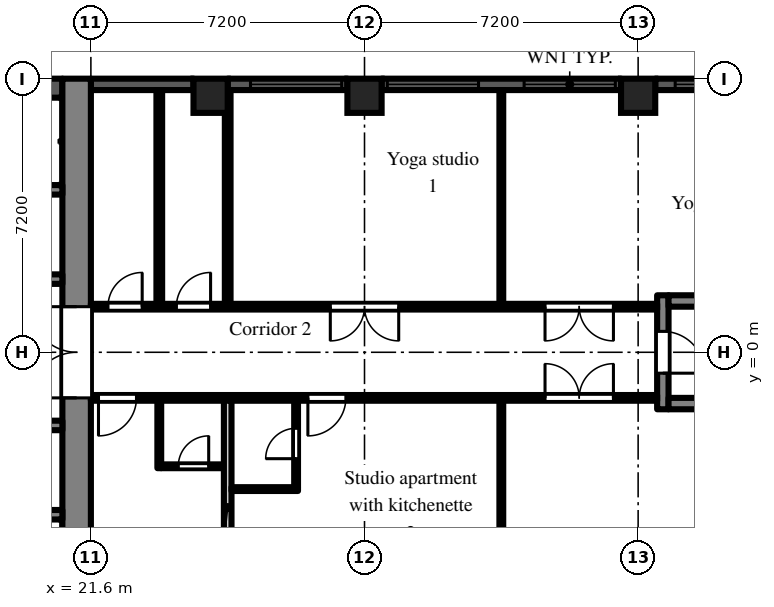
"""IFC4 building model, lengths in metres.
Left out: names, types, materials, properties, quantities, classifications, styles, units other than length and angle.
Written with IfcOpenShell. Run it as: python <this file> out.ifc"""

import sys

from ifc_helpers import new_model, si_unit, direction, frame, frame_2d, origin, origin_2d, place, context, subcontext, project, spatial, rectangle, extrude, element, fill, save


model = new_model("IFC4")
c1 = context("Model", 3, precision=1e-05, world=origin(), true_north=direction((0.0, 1.0)))
c2 = subcontext(c1, "Body", "Model", "MODEL_VIEW")
j1 = project(units=[si_unit("LENGTHUNIT", "METRE"), si_unit("PLANEANGLEUNIT", "RADIAN")], contexts=[c1])
p1 = place(None, origin())
s1 = spatial("IfcSite", under=j1, at=p1, CompositionType="ELEMENT")
p2 = place(p1, origin())
s2 = spatial("IfcBuilding", under=s1, at=p2, CompositionType="ELEMENT")
p3 = place(p2, frame((0.0, 0.0, 108.9)))
s3 = spatial("IfcBuildingStorey", under=s2, at=p3, CompositionType="ELEMENT", Elevation=108.9)
for number, where, z_axis, x_axis in (
    (1, (24.75, 6.75, 0.0), (0.0, 0.0, 1.0), (1.0, 0.0, 0.0)),
    (2, (28.8, 6.75, 0.0), (0.0, 0.0, 1.0), (1.0, 0.0, 0.0)),
    (3, (36.0, 6.75, 0.0), (0.0, 0.0, 1.0), (1.0, 0.0, 0.0)),
):
    element("IfcColumn", number, at=place(p3, frame(where, z_axis=z_axis, x_axis=x_axis)), inside=s3, PredefinedType="COLUMN", context=c2, shape_type="SweptSolid", body=[
        extrude(rectangle(XDim=0.9, YDim=0.9, at=origin_2d()), origin(), (0.0, 0.0, 1.0), 3.0),
    ])
p4 = place(p3, frame((38.7, 7.05, 0.0), z_axis=(0.0, 0.0, 1.0), x_axis=(-1.0, 0.0, 0.0)))
e4 = element("IfcWall", 4, at=p4, inside=s3, PredefinedType="SOLIDWALL", context=c2, shape_type="SweptSolid", body=[
    extrude(rectangle(XDim=2.25, YDim=0.3, at=frame_2d((1.125, 0.0))), origin(), (0.0, 0.0, 1.0), 2.2),
])
p5 = place(p4, frame((0.525, 0.0, 0.2)))
e5 = element("IfcOpeningElement", 5, at=p5, cuts=e4, PredefinedType="OPENING", context=c2, shape_type="SweptSolid", body=[
    extrude(rectangle(XDim=1.2, YDim=1.85, at=frame_2d((0.6, 0.925))), frame((0.0, 0.16, 0.0), z_axis=(0.0, -1.0, 0.0), x_axis=(1.0, 0.0, 0.0)), (0.0, 0.0, 1.0), 0.32),
])
p6 = place(p3, frame((35.55, 7.05, 0.0), z_axis=(0.0, 0.0, 1.0), x_axis=(-1.0, 0.0, 0.0)))
e6 = element("IfcWall", 6, at=p6, inside=s3, PredefinedType="SOLIDWALL", context=c2, shape_type="SweptSolid", body=[
    extrude(rectangle(XDim=6.3, YDim=0.3, at=frame_2d((3.15, 0.0))), origin(), (0.0, 0.0, 1.0), 2.2),
])
p7 = place(p6, frame((0.15, 0.0, 0.2)))
e7 = element("IfcOpeningElement", 7, at=p7, cuts=e6, PredefinedType="OPENING", context=c2, shape_type="SweptSolid", body=[
    extrude(rectangle(XDim=2.4, YDim=1.85, at=frame_2d((1.2, 0.925))), frame((0.0, 0.16, 0.0), z_axis=(0.0, -1.0, 0.0), x_axis=(1.0, 0.0, 0.0)), (0.0, 0.0, 1.0), 0.32),
])
p8 = place(p6, frame((3.75, 0.0, 0.2)))
e8 = element("IfcOpeningElement", 8, at=p8, cuts=e6, PredefinedType="OPENING", context=c2, shape_type="SweptSolid", body=[
    extrude(rectangle(XDim=2.4, YDim=1.85, at=frame_2d((1.2, 0.925))), frame((0.0, 0.16, 0.0), z_axis=(0.0, -1.0, 0.0), x_axis=(1.0, 0.0, 0.0)), (0.0, 0.0, 1.0), 0.32),
])
p9 = place(p3, frame((28.35, 7.05, 0.0), z_axis=(0.0, 0.0, 1.0), x_axis=(-1.0, 0.0, 0.0)))
e9 = element("IfcWall", 9, at=p9, inside=s3, PredefinedType="SOLIDWALL", context=c2, shape_type="SweptSolid", body=[
    extrude(rectangle(XDim=3.15, YDim=0.3, at=frame_2d((1.575, 0.0))), origin(), (0.0, 0.0, 1.0), 2.2),
])
p10 = place(p9, frame((0.15, 0.0, 0.2)))
e10 = element("IfcOpeningElement", 10, at=p10, cuts=e9, PredefinedType="OPENING", context=c2, shape_type="SweptSolid", body=[
    extrude(rectangle(XDim=2.4, YDim=1.85, at=frame_2d((1.2, 0.925))), frame((0.0, 0.16, 0.0), z_axis=(0.0, -1.0, 0.0), x_axis=(1.0, 0.0, 0.0)), (0.0, 0.0, 1.0), 0.32),
])
p11 = place(p3, frame((24.3, 7.05, 0.0), z_axis=(0.0, 0.0, 1.0), x_axis=(-1.0, 0.0, 0.0)))
e11 = element("IfcWall", 11, at=p11, inside=s3, PredefinedType="SOLIDWALL", context=c2, shape_type="SweptSolid", body=[
    extrude(rectangle(XDim=2.7, YDim=0.3, at=frame_2d((1.35, 0.0))), origin(), (0.0, 0.0, 1.0), 2.2),
])
p12 = place(p3, frame((21.225, -7.2, 0.0), z_axis=(0.0, 0.0, 1.0), x_axis=(0.0, 1.0, 0.0)))
e12 = element("IfcWall", 12, at=p12, inside=s3, PredefinedType="SHEAR", context=c2, shape_type="SweptSolid", body=[
    extrude(rectangle(XDim=14.4, YDim=0.75, at=frame_2d((7.2, 0.0))), origin(), (0.0, 0.0, 1.0), 2.55),
])
p13 = place(p12, frame((6.0, 0.0, 0.0)))
e13 = element("IfcOpeningElement", 13, at=p13, cuts=e12, PredefinedType="OPENING", context=c2, shape_type="SweptSolid", body=[
    extrude(rectangle(XDim=2.4, YDim=2.2, at=frame_2d((1.2, 1.1))), frame((0.0, 0.385, 0.0), z_axis=(0.0, -1.0, 0.0), x_axis=(1.0, 0.0, 0.0)), (0.0, 0.0, 1.0), 0.77),
])
p14 = place(p3, frame((7.9, 6.95, 0.0), z_axis=(0.0, 0.0, 1.0), x_axis=(1.0, 0.0, 0.0)))
e14 = element("IfcWall", 14, at=p14, inside=s3, PredefinedType="SHEAR", context=c2, shape_type="SweptSolid", body=[
    extrude(rectangle(XDim=12.95, YDim=0.5, at=frame_2d((6.475, 0.0))), origin(), (0.0, 0.0, 1.0), 2.55),
])
p15 = place(p3, frame((7.9, 1.925, 0.0), z_axis=(0.0, 0.0, 1.0), x_axis=(1.0, 0.0, 0.0)))
e15 = element("IfcWall", 15, at=p15, inside=s3, PredefinedType="SHEAR", context=c2, shape_type="SweptSolid", body=[
    extrude(rectangle(XDim=12.95, YDim=0.25, at=frame_2d((6.475, 0.0))), origin(), (0.0, 0.0, 1.0), 2.55),
])
p16 = place(p15, frame((0.525, 0.0, 0.0)))
e16 = element("IfcOpeningElement", 16, at=p16, cuts=e15, PredefinedType="OPENING", context=c2, shape_type="SweptSolid", body=[
    extrude(rectangle(XDim=0.9, YDim=2.1, at=frame_2d((0.45, 1.05))), frame((0.0, 0.135, 0.0), z_axis=(0.0, -1.0, 0.0), x_axis=(1.0, 0.0, 0.0)), (0.0, 0.0, 1.0), 0.27),
])
p17 = place(p15, frame((2.625, 0.0, 0.0)))
e17 = element("IfcOpeningElement", 17, at=p17, cuts=e15, PredefinedType="OPENING", context=c2, shape_type="SweptSolid", body=[
    extrude(rectangle(XDim=1.1, YDim=2.1, at=frame_2d((0.55, 1.05))), frame((0.0, 0.135, 0.0), z_axis=(0.0, -1.0, 0.0), x_axis=(1.0, 0.0, 0.0)), (0.0, 0.0, 1.0), 0.27),
])
p18 = place(p15, frame((4.925, 0.0, 0.0)))
e18 = element("IfcOpeningElement", 18, at=p18, cuts=e15, PredefinedType="OPENING", context=c2, shape_type="SweptSolid", body=[
    extrude(rectangle(XDim=0.9, YDim=2.1, at=frame_2d((0.45, 1.05))), frame((0.0, 0.135, 0.0), z_axis=(0.0, -1.0, 0.0), x_axis=(1.0, 0.0, 0.0)), (0.0, 0.0, 1.0), 0.27),
])
p19 = place(p15, frame((8.225, 0.0, 0.0)))
e19 = element("IfcOpeningElement", 19, at=p19, cuts=e15, PredefinedType="OPENING", context=c2, shape_type="SweptSolid", body=[
    extrude(rectangle(XDim=0.9, YDim=2.1, at=frame_2d((0.45, 1.05))), frame((0.0, 0.135, 0.0), z_axis=(0.0, -1.0, 0.0), x_axis=(1.0, 0.0, 0.0)), (0.0, 0.0, 1.0), 0.27),
])
p20 = place(p3, frame((12.3, 4.275, 0.0), z_axis=(0.0, 0.0, 1.0), x_axis=(1.0, 0.0, 0.0)))
e20 = element("IfcWall", 20, at=p20, inside=s3, PredefinedType="SHEAR", context=c2, shape_type="SweptSolid", body=[
    extrude(rectangle(XDim=8.55, YDim=0.25, at=frame_2d((4.275, 0.0))), origin(), (0.0, 0.0, 1.0), 2.55),
])
p21 = place(p3, frame((7.9, -1.925, 0.0), z_axis=(0.0, 0.0, 1.0), x_axis=(1.0, 0.0, 0.0)))
e21 = element("IfcWall", 21, at=p21, inside=s3, PredefinedType="SHEAR", context=c2, shape_type="SweptSolid", body=[
    extrude(rectangle(XDim=12.95, YDim=0.25, at=frame_2d((6.475, 0.0))), origin(), (0.0, 0.0, 1.0), 2.55),
])
p22 = place(p21, frame((4.825, 0.0, 0.0)))
e22 = element("IfcOpeningElement", 22, at=p22, cuts=e21, PredefinedType="OPENING", context=c2, shape_type="SweptSolid", body=[
    extrude(rectangle(XDim=1.1, YDim=2.1, at=frame_2d((0.55, 1.05))), frame((0.0, 0.135, 0.0), z_axis=(0.0, -1.0, 0.0), x_axis=(1.0, 0.0, 0.0)), (0.0, 0.0, 1.0), 0.27),
])
p23 = place(p21, frame((7.025, 0.0, 0.0)))
e23 = element("IfcOpeningElement", 23, at=p23, cuts=e21, PredefinedType="OPENING", context=c2, shape_type="SweptSolid", body=[
    extrude(rectangle(XDim=1.1, YDim=2.1, at=frame_2d((0.55, 1.05))), frame((0.0, 0.135, 0.0), z_axis=(0.0, -1.0, 0.0), x_axis=(1.0, 0.0, 0.0)), (0.0, 0.0, 1.0), 0.27),
])
p24 = place(p21, frame((9.225, 0.0, 0.0)))
e24 = element("IfcOpeningElement", 24, at=p24, cuts=e21, PredefinedType="OPENING", context=c2, shape_type="SweptSolid", body=[
    extrude(rectangle(XDim=1.1, YDim=2.1, at=frame_2d((0.55, 1.05))), frame((0.0, 0.135, 0.0), z_axis=(0.0, -1.0, 0.0), x_axis=(1.0, 0.0, 0.0)), (0.0, 0.0, 1.0), 0.27),
])
p25 = place(p21, frame((0.525, 0.0, 0.0)))
e25 = element("IfcOpeningElement", 25, at=p25, cuts=e21, PredefinedType="OPENING", context=c2, shape_type="SweptSolid", body=[
    extrude(rectangle(XDim=0.9, YDim=2.1, at=frame_2d((0.45, 1.05))), frame((0.0, 0.135, 0.0), z_axis=(0.0, -1.0, 0.0), x_axis=(1.0, 0.0, 0.0)), (0.0, 0.0, 1.0), 0.27),
])
p26 = place(p21, frame((2.625, 0.0, 0.0)))
e26 = element("IfcOpeningElement", 26, at=p26, cuts=e21, PredefinedType="OPENING", context=c2, shape_type="SweptSolid", body=[
    extrude(rectangle(XDim=1.1, YDim=2.1, at=frame_2d((0.55, 1.05))), frame((0.0, 0.135, 0.0), z_axis=(0.0, -1.0, 0.0), x_axis=(1.0, 0.0, 0.0)), (0.0, 0.0, 1.0), 0.27),
])
p27 = place(p3, frame((12.3, -4.275, 0.0), z_axis=(0.0, 0.0, 1.0), x_axis=(1.0, 0.0, 0.0)))
e27 = element("IfcWall", 27, at=p27, inside=s3, PredefinedType="SHEAR", context=c2, shape_type="SweptSolid", body=[
    extrude(rectangle(XDim=8.55, YDim=0.25, at=frame_2d((4.275, 0.0))), origin(), (0.0, 0.0, 1.0), 2.55),
])
p28 = place(p3, frame((36.65, -1.5, 0.0), z_axis=(0.0, 0.0, 1.0), x_axis=(0.0, 1.0, 0.0)))
e28 = element("IfcWall", 28, at=p28, inside=s3, PredefinedType="SHEAR", context=c2, shape_type="SweptSolid", body=[
    extrude(rectangle(XDim=3.0, YDim=0.3, at=frame_2d((1.5, 0.0))), origin(), (0.0, 0.0, 1.0), 2.55),
])
p29 = place(p28, frame((0.95, 0.0, 0.0)))
e29 = element("IfcOpeningElement", 29, at=p29, cuts=e28, PredefinedType="OPENING", context=c2, shape_type="SweptSolid", body=[
    extrude(rectangle(XDim=1.1, YDim=2.1, at=frame_2d((0.55, 1.05))), frame((0.0, 0.16, 0.0), z_axis=(0.0, -1.0, 0.0), x_axis=(1.0, 0.0, 0.0)), (0.0, 0.0, 1.0), 0.32),
])
for number, where, z_axis, x_axis in (
    (30, (36.8, -1.35, 0.0), (0.0, 0.0, 1.0), (1.0, 0.0, 0.0)),
    (31, (36.8, 1.35, 0.0), (0.0, 0.0, 1.0), (1.0, 0.0, 0.0)),
):
    element("IfcWall", number, at=place(p3, frame(where, z_axis=z_axis, x_axis=x_axis)), inside=s3, PredefinedType="SHEAR", context=c2, shape_type="SweptSolid", body=[
        extrude(rectangle(XDim=5.8, YDim=0.3, at=frame_2d((2.9, 0.0))), origin(), (0.0, 0.0, 1.0), 2.55),
    ])
p30 = place(p3, frame((21.6, -1.2, 0.0), z_axis=(0.0, 0.0, 1.0), x_axis=(1.0, 0.0, 0.0)))
e32 = element("IfcWall", 32, at=p30, inside=s3, PredefinedType="PARTITIONING", context=c2, shape_type="SweptSolid", body=[
    extrude(rectangle(XDim=14.9, YDim=0.15, at=frame_2d((7.45, 0.0))), origin(), (0.0, 0.0, 1.0), 2.55),
])
p31 = place(p30, frame((0.2, 0.0, 0.0)))
e33 = element("IfcOpeningElement", 33, at=p31, cuts=e32, PredefinedType="OPENING", context=c2, shape_type="SweptSolid", body=[
    extrude(rectangle(XDim=1.0, YDim=2.1, at=frame_2d((0.5, 1.05))), frame((0.0, 0.085, 0.0), z_axis=(0.0, -1.0, 0.0), x_axis=(1.0, 0.0, 0.0)), (0.0, 0.0, 1.0), 0.17),
])
p32 = place(p30, frame((5.71, 0.0, 0.0)))
e34 = element("IfcOpeningElement", 34, at=p32, cuts=e32, PredefinedType="OPENING", context=c2, shape_type="SweptSolid", body=[
    extrude(rectangle(XDim=1.0, YDim=2.1, at=frame_2d((0.5, 1.05))), frame((0.0, 0.085, 0.0), z_axis=(0.0, -1.0, 0.0), x_axis=(1.0, 0.0, 0.0)), (0.0, 0.0, 1.0), 0.17),
])
p33 = place(p30, frame((11.95, 0.0, 0.0)))
e35 = element("IfcOpeningElement", 35, at=p33, cuts=e32, PredefinedType="OPENING", context=c2, shape_type="SweptSolid", body=[
    extrude(rectangle(XDim=1.8, YDim=2.1, at=frame_2d((0.9, 1.05))), frame((0.0, 0.085, 0.0), z_axis=(0.0, -1.0, 0.0), x_axis=(1.0, 0.0, 0.0)), (0.0, 0.0, 1.0), 0.17),
])
p34 = place(p3, frame((21.6, 1.2, 0.0), z_axis=(0.0, 0.0, 1.0), x_axis=(1.0, 0.0, 0.0)))
e36 = element("IfcWall", 36, at=p34, inside=s3, PredefinedType="PARTITIONING", context=c2, shape_type="SweptSolid", body=[
    extrude(rectangle(XDim=14.9, YDim=0.15, at=frame_2d((7.45, 0.0))), origin(), (0.0, 0.0, 1.0), 2.55),
])
p35 = place(p34, frame((0.45, 0.0, 0.0)))
e37 = element("IfcOpeningElement", 37, at=p35, cuts=e36, PredefinedType="OPENING", context=c2, shape_type="SweptSolid", body=[
    extrude(rectangle(XDim=0.9, YDim=2.1, at=frame_2d((0.45, 1.05))), frame((0.0, 0.085, 0.0), z_axis=(0.0, -1.0, 0.0), x_axis=(1.0, 0.0, 0.0)), (0.0, 0.0, 1.0), 0.17),
])
p36 = place(p34, frame((2.25, 0.0, 0.0)))
e38 = element("IfcOpeningElement", 38, at=p36, cuts=e36, PredefinedType="OPENING", context=c2, shape_type="SweptSolid", body=[
    extrude(rectangle(XDim=0.9, YDim=2.1, at=frame_2d((0.45, 1.05))), frame((0.0, 0.085, 0.0), z_axis=(0.0, -1.0, 0.0), x_axis=(1.0, 0.0, 0.0)), (0.0, 0.0, 1.0), 0.17),
])
p37 = place(p34, frame((6.3, 0.0, 0.0)))
e39 = element("IfcOpeningElement", 39, at=p37, cuts=e36, PredefinedType="OPENING", context=c2, shape_type="SweptSolid", body=[
    extrude(rectangle(XDim=1.8, YDim=2.1, at=frame_2d((0.9, 1.05))), frame((0.0, 0.085, 0.0), z_axis=(0.0, -1.0, 0.0), x_axis=(1.0, 0.0, 0.0)), (0.0, 0.0, 1.0), 0.17),
])
p38 = place(p34, frame((11.95, 0.0, 0.0)))
e40 = element("IfcOpeningElement", 40, at=p38, cuts=e36, PredefinedType="OPENING", context=c2, shape_type="SweptSolid", body=[
    extrude(rectangle(XDim=1.8, YDim=2.1, at=frame_2d((0.9, 1.05))), frame((0.0, 0.085, 0.0), z_axis=(0.0, -1.0, 0.0), x_axis=(1.0, 0.0, 0.0)), (0.0, 0.0, 1.0), 0.17),
])
p39 = place(p3, frame((23.4, -3.05, 0.0), z_axis=(0.0, 0.0, 1.0), x_axis=(0.0, 1.0, 0.0)))
e41 = element("IfcWall", 41, at=p39, inside=s3, PredefinedType="PARTITIONING", context=c2, shape_type="SweptSolid", body=[
    extrude(rectangle(XDim=1.775, YDim=0.1, at=frame_2d((0.888, 0.0))), origin(), (0.0, 0.0, 1.0), 2.55),
])
p40 = place(p3, frame((23.45, -3.0, 0.0), z_axis=(0.0, 0.0, 1.0), x_axis=(1.0, 0.0, 0.0)))
e42 = element("IfcWall", 42, at=p40, inside=s3, PredefinedType="PARTITIONING", context=c2, shape_type="SweptSolid", body=[
    extrude(rectangle(XDim=1.65, YDim=0.1, at=frame_2d((0.825, 0.0))), origin(), (0.0, 0.0, 1.0), 2.55),
])
p41 = place(p40, frame((0.45, 0.0, 0.0)))
e43 = element("IfcOpeningElement", 43, at=p41, cuts=e42, PredefinedType="OPENING", context=c2, shape_type="SweptSolid", body=[
    extrude(rectangle(XDim=0.8, YDim=2.1, at=frame_2d((0.4, 1.05))), frame((0.0, 0.06, 0.0), z_axis=(0.0, -1.0, 0.0), x_axis=(1.0, 0.0, 0.0)), (0.0, 0.0, 1.0), 0.12),
])
p42 = place(p3, frame((23.4, 1.275, 0.0), z_axis=(0.0, 0.0, 1.0), x_axis=(0.0, 1.0, 0.0)))
e44 = element("IfcWall", 44, at=p42, inside=s3, PredefinedType="PARTITIONING", context=c2, shape_type="SweptSolid", body=[
    extrude(rectangle(XDim=5.625, YDim=0.15, at=frame_2d((2.812, 0.0))), origin(), (0.0, 0.0, 1.0), 2.55),
])
p43 = place(p3, frame((25.2, -6.9, 0.0), z_axis=(0.0, 0.0, 1.0), x_axis=(0.0, 1.0, 0.0)))
e45 = element("IfcWall", 45, at=p43, inside=s3, PredefinedType="PARTITIONING", context=c2, shape_type="SweptSolid", body=[
    extrude(rectangle(XDim=5.625, YDim=0.2, at=frame_2d((2.812, 0.0))), origin(), (0.0, 0.0, 1.0), 2.55),
])
p44 = place(p3, frame((25.3, -3.6, 0.0), z_axis=(0.0, 0.0, 1.0), x_axis=(1.0, 0.0, 0.0)))
e46 = element("IfcWall", 46, at=p44, inside=s3, PredefinedType="PARTITIONING", context=c2, shape_type="SweptSolid", body=[
    extrude(rectangle(XDim=1.75, YDim=0.1, at=frame_2d((0.875, 0.0))), origin(), (0.0, 0.0, 1.0), 2.55),
])
p45 = place(p3, frame((25.2, 1.275, 0.0), z_axis=(0.0, 0.0, 1.0), x_axis=(0.0, 1.0, 0.0)))
e47 = element("IfcWall", 47, at=p45, inside=s3, PredefinedType="PARTITIONING", context=c2, shape_type="SweptSolid", body=[
    extrude(rectangle(XDim=5.625, YDim=0.15, at=frame_2d((2.812, 0.0))), origin(), (0.0, 0.0, 1.0), 2.55),
])
p46 = place(p3, frame((27.0, -3.55, 0.0), z_axis=(0.0, 0.0, 1.0), x_axis=(0.0, 1.0, 0.0)))
e48 = element("IfcWall", 48, at=p46, inside=s3, PredefinedType="PARTITIONING", context=c2, shape_type="SweptSolid", body=[
    extrude(rectangle(XDim=2.275, YDim=0.1, at=frame_2d((1.138, 0.0))), origin(), (0.0, 0.0, 1.0), 2.55),
])
p47 = place(p46, frame((0.75, 0.0, 0.0)))
e49 = element("IfcOpeningElement", 49, at=p47, cuts=e48, PredefinedType="OPENING", context=c2, shape_type="SweptSolid", body=[
    extrude(rectangle(XDim=0.8, YDim=2.1, at=frame_2d((0.4, 1.05))), frame((0.0, 0.06, 0.0), z_axis=(0.0, -1.0, 0.0), x_axis=(1.0, 0.0, 0.0)), (0.0, 0.0, 1.0), 0.12),
])
for number, where, z_axis, x_axis in (
    (50, (32.4, -6.9, 0.0), (0.0, 0.0, 1.0), (0.0, 1.0, 0.0)),
    (51, (32.4, 1.275, 0.0), (0.0, 0.0, 1.0), (0.0, 1.0, 0.0)),
):
    element("IfcWall", number, at=place(p3, frame(where, z_axis=z_axis, x_axis=x_axis)), inside=s3, PredefinedType="PARTITIONING", context=c2, shape_type="SweptSolid", body=[
        extrude(rectangle(XDim=5.625, YDim=0.1, at=frame_2d((2.812, 0.0))), origin(), (0.0, 0.0, 1.0), 2.55),
    ])
p48 = place(p5, origin())
e52 = element("IfcWindow", 52, at=p48, inside=s3, PartitioningType="SINGLE_PANEL", PredefinedType="WINDOW", context=c2, shape_type="SweptSolid", body=[
    extrude(rectangle(XDim=1.2, YDim=1.85, at=frame_2d((0.6, 0.925))), frame((0.0, 0.03, 0.0), z_axis=(0.0, -1.0, 0.0), x_axis=(1.0, 0.0, 0.0)), (0.0, 0.0, 1.0), 0.06),
])
fill(e5, e52)
p49 = place(p7, origin())
e53 = element("IfcWindow", 53, at=p49, inside=s3, PartitioningType="SINGLE_PANEL", PredefinedType="WINDOW", context=c2, shape_type="SweptSolid", body=[
    extrude(rectangle(XDim=2.4, YDim=1.85, at=frame_2d((1.2, 0.925))), frame((0.0, 0.03, 0.0), z_axis=(0.0, -1.0, 0.0), x_axis=(1.0, 0.0, 0.0)), (0.0, 0.0, 1.0), 0.06),
])
fill(e7, e53)
p50 = place(p8, origin())
e54 = element("IfcWindow", 54, at=p50, inside=s3, PartitioningType="SINGLE_PANEL", PredefinedType="WINDOW", context=c2, shape_type="SweptSolid", body=[
    extrude(rectangle(XDim=2.4, YDim=1.85, at=frame_2d((1.2, 0.925))), frame((0.0, 0.03, 0.0), z_axis=(0.0, -1.0, 0.0), x_axis=(1.0, 0.0, 0.0)), (0.0, 0.0, 1.0), 0.06),
])
fill(e8, e54)
p51 = place(p10, origin())
e55 = element("IfcWindow", 55, at=p51, inside=s3, PartitioningType="SINGLE_PANEL", PredefinedType="WINDOW", context=c2, shape_type="SweptSolid", body=[
    extrude(rectangle(XDim=2.4, YDim=1.85, at=frame_2d((1.2, 0.925))), frame((0.0, 0.03, 0.0), z_axis=(0.0, -1.0, 0.0), x_axis=(1.0, 0.0, 0.0)), (0.0, 0.0, 1.0), 0.06),
])
fill(e10, e55)
p52 = place(p13, origin())
e56 = element("IfcDoor", 56, at=p52, inside=s3, OperationType="DOUBLE_DOOR_DOUBLE_SWING", PredefinedType="DOOR", context=c2, shape_type="SweptSolid", body=[
    extrude(rectangle(XDim=2.4, YDim=2.2, at=frame_2d((1.2, 1.1))), frame((0.0, 0.025, 0.0), z_axis=(0.0, -1.0, 0.0), x_axis=(1.0, 0.0, 0.0)), (0.0, 0.0, 1.0), 0.05),
])
fill(e13, e56)
p53 = place(p29, frame((1.1, 0.0, 0.0), z_axis=(0.0, 0.0, 1.0), x_axis=(-1.0, 0.0, 0.0)))
e57 = element("IfcDoor", 57, at=p53, inside=s3, OperationType="SINGLE_SWING_RIGHT", PredefinedType="DOOR", context=c2, shape_type="SweptSolid", body=[
    extrude(rectangle(XDim=1.1, YDim=2.1, at=frame_2d((0.55, 1.05))), frame((0.0, 0.025, 0.0), z_axis=(0.0, -1.0, 0.0), x_axis=(1.0, 0.0, 0.0)), (0.0, 0.0, 1.0), 0.05),
])
fill(e29, e57)
p54 = place(p35, origin())
e58 = element("IfcDoor", 58, at=p54, inside=s3, OperationType="SINGLE_SWING_RIGHT", PredefinedType="DOOR", context=c2, shape_type="SweptSolid", body=[
    extrude(rectangle(XDim=0.9, YDim=2.1, at=frame_2d((0.45, 1.05))), frame((0.0, 0.025, 0.0), z_axis=(0.0, -1.0, 0.0), x_axis=(1.0, 0.0, 0.0)), (0.0, 0.0, 1.0), 0.05),
])
fill(e37, e58)
p55 = place(p36, origin())
e59 = element("IfcDoor", 59, at=p55, inside=s3, OperationType="SINGLE_SWING_RIGHT", PredefinedType="DOOR", context=c2, shape_type="SweptSolid", body=[
    extrude(rectangle(XDim=0.9, YDim=2.1, at=frame_2d((0.45, 1.05))), frame((0.0, 0.025, 0.0), z_axis=(0.0, -1.0, 0.0), x_axis=(1.0, 0.0, 0.0)), (0.0, 0.0, 1.0), 0.05),
])
fill(e38, e59)
p56 = place(p37, frame((1.8, 0.0, 0.0), z_axis=(0.0, 0.0, 1.0), x_axis=(-1.0, 0.0, 0.0)))
e60 = element("IfcDoor", 60, at=p56, inside=s3, OperationType="DOUBLE_DOOR_DOUBLE_SWING", PredefinedType="DOOR", context=c2, shape_type="SweptSolid", body=[
    extrude(rectangle(XDim=1.8, YDim=2.1, at=frame_2d((0.9, 1.05))), frame((0.0, 0.025, 0.0), z_axis=(0.0, -1.0, 0.0), x_axis=(1.0, 0.0, 0.0)), (0.0, 0.0, 1.0), 0.05),
])
fill(e39, e60)
p57 = place(p38, frame((1.8, 0.0, 0.0), z_axis=(0.0, 0.0, 1.0), x_axis=(-1.0, 0.0, 0.0)))
e61 = element("IfcDoor", 61, at=p57, inside=s3, OperationType="DOUBLE_DOOR_DOUBLE_SWING", PredefinedType="DOOR", context=c2, shape_type="SweptSolid", body=[
    extrude(rectangle(XDim=1.8, YDim=2.1, at=frame_2d((0.9, 1.05))), frame((0.0, 0.025, 0.0), z_axis=(0.0, -1.0, 0.0), x_axis=(1.0, 0.0, 0.0)), (0.0, 0.0, 1.0), 0.05),
])
fill(e40, e61)
p58 = place(p41, origin())
e62 = element("IfcDoor", 62, at=p58, inside=s3, OperationType="SINGLE_SWING_RIGHT", PredefinedType="DOOR", context=c2, shape_type="SweptSolid", body=[
    extrude(rectangle(XDim=0.8, YDim=2.1, at=frame_2d((0.4, 1.05))), frame((0.0, 0.025, 0.0), z_axis=(0.0, -1.0, 0.0), x_axis=(1.0, 0.0, 0.0)), (0.0, 0.0, 1.0), 0.05),
])
fill(e43, e62)
p59 = place(p31, frame((1.0, 0.0, 0.0), z_axis=(0.0, 0.0, 1.0), x_axis=(-1.0, 0.0, 0.0)))
e63 = element("IfcDoor", 63, at=p59, inside=s3, OperationType="SINGLE_SWING_RIGHT", PredefinedType="DOOR", context=c2, shape_type="SweptSolid", body=[
    extrude(rectangle(XDim=1.0, YDim=2.1, at=frame_2d((0.5, 1.05))), frame((0.0, 0.025, 0.0), z_axis=(0.0, -1.0, 0.0), x_axis=(1.0, 0.0, 0.0)), (0.0, 0.0, 1.0), 0.05),
])
fill(e33, e63)
p60 = place(p47, origin())
e64 = element("IfcDoor", 64, at=p60, inside=s3, OperationType="SINGLE_SWING_LEFT", PredefinedType="DOOR", context=c2, shape_type="SweptSolid", body=[
    extrude(rectangle(XDim=0.8, YDim=2.1, at=frame_2d((0.4, 1.05))), frame((0.0, 0.025, 0.0), z_axis=(0.0, -1.0, 0.0), x_axis=(1.0, 0.0, 0.0)), (0.0, 0.0, 1.0), 0.05),
])
fill(e49, e64)
p61 = place(p32, frame((1.0, 0.0, 0.0), z_axis=(0.0, 0.0, 1.0), x_axis=(-1.0, 0.0, 0.0)))
e65 = element("IfcDoor", 65, at=p61, inside=s3, OperationType="SINGLE_SWING_RIGHT", PredefinedType="DOOR", context=c2, shape_type="SweptSolid", body=[
    extrude(rectangle(XDim=1.0, YDim=2.1, at=frame_2d((0.5, 1.05))), frame((0.0, 0.025, 0.0), z_axis=(0.0, -1.0, 0.0), x_axis=(1.0, 0.0, 0.0)), (0.0, 0.0, 1.0), 0.05),
])
fill(e34, e65)
p62 = place(p33, origin())
e66 = element("IfcDoor", 66, at=p62, inside=s3, OperationType="DOUBLE_DOOR_DOUBLE_SWING", PredefinedType="DOOR", context=c2, shape_type="SweptSolid", body=[
    extrude(rectangle(XDim=1.8, YDim=2.1, at=frame_2d((0.9, 1.05))), frame((0.0, 0.025, 0.0), z_axis=(0.0, -1.0, 0.0), x_axis=(1.0, 0.0, 0.0)), (0.0, 0.0, 1.0), 0.05),
])
fill(e35, e66)
save(model, sys.argv[1])
